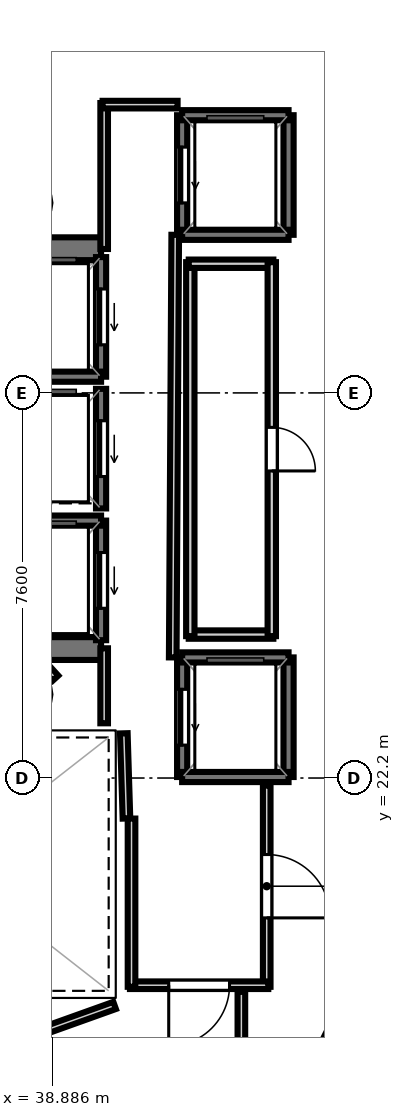
"""IFC4 building model, lengths in metres.
Left out: names, types, materials, properties, quantities, classifications, styles, units other than length and angle.
Written with IfcOpenShell. Run it as: python <this file> out.ifc"""

import sys

from ifc_helpers import new_model, si_unit, direction, frame, frame_2d, origin, place, context, subcontext, project, spatial, rectangle, extrude, element, fill, save


model = new_model("IFC4")
c1 = context("Model", 3, precision=1e-05, world=origin(), true_north=direction((0.0, 1.0)))
c2 = subcontext(c1, "Body", "Model", "MODEL_VIEW")
j1 = project(units=[si_unit("LENGTHUNIT", "METRE"), si_unit("PLANEANGLEUNIT", "RADIAN")], contexts=[c1])
p1 = place(None, origin())
s1 = spatial("IfcSite", under=j1, at=p1, CompositionType="ELEMENT")
p2 = place(p1, origin())
s2 = spatial("IfcBuilding", under=s1, at=p2, CompositionType="ELEMENT")
p3 = place(p2, frame((0.0, 0.0, 313.9)))
s3 = spatial("IfcBuildingStorey", under=s2, at=p3, CompositionType="ELEMENT", Elevation=313.9)
p4 = place(p3, frame((29.33, 32.645, 0.0), z_axis=(0.0, 0.0, 1.0), x_axis=(1.0, 0.0, 0.0)))
e1 = element("IfcWall", 1, at=p4, inside=s3, PredefinedType="SHEAR", context=c2, shape_type="SweptSolid", body=[
    extrude(rectangle(XDim=10.52, YDim=0.45, at=frame_2d((5.26, 0.0))), origin(), (0.0, 0.0, 1.0), 3.52),
])
p5 = place(p4, frame((0.895, 0.0, 0.0)))
e2 = element("IfcOpeningElement", 2, at=p5, cuts=e1, PredefinedType="OPENING", context=c2, shape_type="SweptSolid", body=[
    extrude(rectangle(XDim=1.25, YDim=2.15, at=frame_2d((0.625, 1.075))), frame((0.0, 0.235, 0.0), z_axis=(0.0, -1.0, 0.0), x_axis=(1.0, 0.0, 0.0)), (0.0, 0.0, 1.0), 0.47),
])
p6 = place(p3, frame((29.33, 24.755, 0.0), z_axis=(0.0, 0.0, 1.0), x_axis=(1.0, 0.0, 0.0)))
e3 = element("IfcWall", 3, at=p6, inside=s3, PredefinedType="SHEAR", context=c2, shape_type="SweptSolid", body=[
    extrude(rectangle(XDim=10.52, YDim=0.45, at=frame_2d((5.26, 0.0))), origin(), (0.0, 0.0, 1.0), 3.52),
])
p7 = place(p6, frame((0.695, 0.0, 0.0)))
e4 = element("IfcOpeningElement", 4, at=p7, cuts=e3, PredefinedType="OPENING", context=c2, shape_type="SweptSolid", body=[
    extrude(rectangle(XDim=1.25, YDim=2.15, at=frame_2d((0.625, 1.075))), frame((0.0, 0.235, 0.0), z_axis=(0.0, -1.0, 0.0), x_axis=(1.0, 0.0, 0.0)), (0.0, 0.0, 1.0), 0.47),
])
p8 = place(p3, frame((39.85, 30.12, 0.0), z_axis=(0.0, 0.0, 1.0), x_axis=(0.0, 1.0, 0.0)))
e5 = element("IfcWall", 5, at=p8, inside=s3, PredefinedType="SOLIDWALL", context=c2, shape_type="SweptSolid", body=[
    extrude(rectangle(XDim=2.36, YDim=0.2, at=frame_2d((1.18, 0.0))), origin(), (0.0, 0.0, 1.0), 3.52),
])
p9 = place(p8, frame((0.63, 0.0, 0.0)))
e6 = element("IfcOpeningElement", 6, at=p9, cuts=e5, PredefinedType="OPENING", context=c2, shape_type="SweptSolid", body=[
    extrude(rectangle(XDim=1.1, YDim=2.15, at=frame_2d((0.55, 1.075))), frame((0.0, 0.11, 0.0), z_axis=(0.0, -1.0, 0.0), x_axis=(1.0, 0.0, 0.0)), (0.0, 0.0, 1.0), 0.22),
])
p10 = place(p3, frame((37.75, 30.12, 0.0), z_axis=(0.0, 0.0, 1.0), x_axis=(1.0, 0.0, 0.0)))
e7 = element("IfcWall", 7, at=p10, inside=s3, PredefinedType="SOLIDWALL", context=c2, shape_type="SweptSolid", body=[
    extrude(rectangle(XDim=2.1, YDim=0.2, at=frame_2d((1.05, 0.0))), origin(), (0.0, 0.0, 1.0), 3.52),
])
p11 = place(p3, frame((39.85, 24.92, 0.0), z_axis=(0.0, 0.0, 1.0), x_axis=(0.0, 1.0, 0.0)))
e8 = element("IfcWall", 8, at=p11, inside=s3, PredefinedType="SOLIDWALL", context=c2, shape_type="SweptSolid", body=[
    extrude(rectangle(XDim=2.36, YDim=0.2, at=frame_2d((1.18, 0.0))), origin(), (0.0, 0.0, 1.0), 3.52),
])
p12 = place(p11, frame((0.63, 0.0, 0.0)))
e9 = element("IfcOpeningElement", 9, at=p12, cuts=e8, PredefinedType="OPENING", context=c2, shape_type="SweptSolid", body=[
    extrude(rectangle(XDim=1.1, YDim=2.15, at=frame_2d((0.55, 1.075))), frame((0.0, 0.11, 0.0), z_axis=(0.0, -1.0, 0.0), x_axis=(1.0, 0.0, 0.0)), (0.0, 0.0, 1.0), 0.22),
])
p13 = place(p3, frame((37.75, 27.28, 0.0), z_axis=(0.0, 0.0, 1.0), x_axis=(1.0, 0.0, 0.0)))
e10 = element("IfcWall", 10, at=p13, inside=s3, PredefinedType="SOLIDWALL", context=c2, shape_type="SweptSolid", body=[
    extrude(rectangle(XDim=2.1, YDim=0.2, at=frame_2d((1.05, 0.0))), origin(), (0.0, 0.0, 1.0), 3.52),
])
p14 = place(p3, frame((39.85, 27.52, 0.0), z_axis=(0.0, 0.0, 1.0), x_axis=(0.0, 1.0, 0.0)))
e11 = element("IfcWall", 11, at=p14, inside=s3, PredefinedType="SOLIDWALL", context=c2, shape_type="SweptSolid", body=[
    extrude(rectangle(XDim=2.36, YDim=0.2, at=frame_2d((1.18, 0.0))), origin(), (0.0, 0.0, 1.0), 3.52),
])
p15 = place(p14, frame((0.63, 0.0, 0.0)))
e12 = element("IfcOpeningElement", 12, at=p15, cuts=e11, PredefinedType="OPENING", context=c2, shape_type="SweptSolid", body=[
    extrude(rectangle(XDim=1.1, YDim=2.15, at=frame_2d((0.55, 1.075))), frame((0.0, 0.11, 0.0), z_axis=(0.0, -1.0, 0.0), x_axis=(1.0, 0.0, 0.0)), (0.0, 0.0, 1.0), 0.22),
])
p16 = place(p3, frame((43.55, 22.22, 0.0), z_axis=(0.0, 0.0, 1.0), x_axis=(0.0, 1.0, 0.0)))
e13 = element("IfcWall", 13, at=p16, inside=s3, PredefinedType="SOLIDWALL", context=c2, shape_type="SweptSolid", body=[
    extrude(rectangle(XDim=2.36, YDim=0.2, at=frame_2d((1.18, 0.0))), origin(), (0.0, 0.0, 1.0), 3.52),
])
p17 = place(p3, frame((41.45, 22.22, 0.0), z_axis=(0.0, 0.0, 1.0), x_axis=(0.0, 1.0, 0.0)))
e14 = element("IfcWall", 14, at=p17, inside=s3, PredefinedType="SOLIDWALL", context=c2, shape_type="SweptSolid", body=[
    extrude(rectangle(XDim=2.36, YDim=0.2, at=frame_2d((1.18, 0.0))), origin(), (0.0, 0.0, 1.0), 3.52),
])
p18 = place(p17, frame((0.63, 0.0, 0.0)))
e15 = element("IfcOpeningElement", 15, at=p18, cuts=e14, PredefinedType="OPENING", context=c2, shape_type="SweptSolid", body=[
    extrude(rectangle(XDim=1.1, YDim=2.15, at=frame_2d((0.55, 1.075))), frame((0.0, 0.11, 0.0), z_axis=(0.0, -1.0, 0.0), x_axis=(1.0, 0.0, 0.0)), (0.0, 0.0, 1.0), 0.22),
])
for number, where, z_axis, x_axis in (
    (16, (41.45, 24.58, 0.0), (0.0, 0.0, 1.0), (1.0, 0.0, 0.0)),
    (17, (41.45, 22.22, 0.0), (0.0, 0.0, 1.0), (1.0, 0.0, 0.0)),
):
    element("IfcWall", number, at=place(p3, frame(where, z_axis=z_axis, x_axis=x_axis)), inside=s3, PredefinedType="SOLIDWALL", context=c2, shape_type="SweptSolid", body=[
        extrude(rectangle(XDim=2.1, YDim=0.2, at=frame_2d((1.05, 0.0))), origin(), (0.0, 0.0, 1.0), 3.52),
    ])
p19 = place(p3, frame((43.55, 32.92, 0.0), z_axis=(0.0, 0.0, 1.0), x_axis=(0.0, 1.0, 0.0)))
e18 = element("IfcWall", 18, at=p19, inside=s3, PredefinedType="SOLIDWALL", context=c2, shape_type="SweptSolid", body=[
    extrude(rectangle(XDim=2.36, YDim=0.2, at=frame_2d((1.18, 0.0))), origin(), (0.0, 0.0, 1.0), 3.52),
])
p20 = place(p3, frame((41.45, 32.92, 0.0), z_axis=(0.0, 0.0, 1.0), x_axis=(0.0, 1.0, 0.0)))
e19 = element("IfcWall", 19, at=p20, inside=s3, PredefinedType="SOLIDWALL", context=c2, shape_type="SweptSolid", body=[
    extrude(rectangle(XDim=2.36, YDim=0.2, at=frame_2d((1.18, 0.0))), origin(), (0.0, 0.0, 1.0), 3.52),
])
p21 = place(p20, frame((0.63, 0.0, 0.0)))
e20 = element("IfcOpeningElement", 20, at=p21, cuts=e19, PredefinedType="OPENING", context=c2, shape_type="SweptSolid", body=[
    extrude(rectangle(XDim=1.1, YDim=2.15, at=frame_2d((0.55, 1.075))), frame((0.0, 0.11, 0.0), z_axis=(0.0, -1.0, 0.0), x_axis=(1.0, 0.0, 0.0)), (0.0, 0.0, 1.0), 0.22),
])
for number, where, z_axis, x_axis in (
    (21, (41.45, 35.28, 0.0), (0.0, 0.0, 1.0), (1.0, 0.0, 0.0)),
    (22, (41.45, 32.92, 0.0), (0.0, 0.0, 1.0), (1.0, 0.0, 0.0)),
):
    element("IfcWall", number, at=place(p3, frame(where, z_axis=z_axis, x_axis=x_axis)), inside=s3, PredefinedType="SOLIDWALL", context=c2, shape_type="SweptSolid", body=[
        extrude(rectangle(XDim=2.1, YDim=0.2, at=frame_2d((1.05, 0.0))), origin(), (0.0, 0.0, 1.0), 3.52),
    ])
p22 = place(p3, frame((40.351, 21.401, 0.0), z_axis=(0.0, 0.0, 1.0), x_axis=(-0.031058045979, 0.999517582527, 0.0)))
e23 = element("IfcWall", 23, at=p22, inside=s3, PredefinedType="PARTITIONING", context=c2, shape_type="SweptSolid", body=[
    extrude(rectangle(XDim=1.682, YDim=0.15, at=frame_2d((0.841, 0.0))), origin(), (0.0, 0.0, 1.0), 2.84),
])
p23 = place(p3, frame((39.911, 23.28, 0.0), z_axis=(0.0, 0.0, 1.0), x_axis=(0.0, 1.0, 0.0)))
e24 = element("IfcWall", 24, at=p23, inside=s3, PredefinedType="PARTITIONING", context=c2, shape_type="SweptSolid", body=[
    extrude(rectangle(XDim=1.48, YDim=0.15, at=frame_2d((0.74, 0.0))), origin(), (0.0, 0.0, 1.0), 2.84),
])
p24 = place(p3, frame((39.911, 32.64, 0.0), z_axis=(0.0, 0.0, 1.0), x_axis=(0.0, 1.0, 0.0)))
e25 = element("IfcWall", 25, at=p24, inside=s3, PredefinedType="PARTITIONING", context=c2, shape_type="SweptSolid", body=[
    extrude(rectangle(XDim=2.88, YDim=0.15, at=frame_2d((1.44, 0.0))), origin(), (0.0, 0.0, 1.0), 2.84),
])
p25 = place(p3, frame((39.88, 35.489, 0.0), z_axis=(0.0, 0.0, 1.0), x_axis=(1.0, 0.0, 0.0)))
e26 = element("IfcWall", 26, at=p25, inside=s3, PredefinedType="PARTITIONING", context=c2, shape_type="SweptSolid", body=[
    extrude(rectangle(XDim=1.48, YDim=0.15, at=frame_2d((0.74, 0.0))), origin(), (0.0, 0.0, 1.0), 2.84),
])
p26 = place(p3, frame((41.313, 32.92, 0.0), z_axis=(0.0, 0.0, 1.0), x_axis=(-0.005942518022, -0.999982343084, 0.0)))
e27 = element("IfcWall", 27, at=p26, inside=s3, PredefinedType="PARTITIONING", context=c2, shape_type="SweptSolid", body=[
    extrude(rectangle(XDim=8.34, YDim=0.15, at=frame_2d((4.17, 0.0))), origin(), (0.0, 0.0, 1.0), 2.84),
])
p27 = place(p3, frame((43.119, 22.05, 0.0), z_axis=(0.0, 0.0, 1.0), x_axis=(0.0, -1.0, 0.0)))
e28 = element("IfcWall", 28, at=p27, inside=s3, PredefinedType="PARTITIONING", context=c2, shape_type="SweptSolid", body=[
    extrude(rectangle(XDim=3.97, YDim=0.15, at=frame_2d((1.985, 0.0))), origin(), (0.0, 0.0, 1.0), 2.84),
])
p28 = place(p27, frame((1.36, 0.0, 0.0)))
e29 = element("IfcOpeningElement", 29, at=p28, cuts=e28, PredefinedType="OPENING", context=c2, shape_type="SweptSolid", body=[
    extrude(rectangle(XDim=1.25, YDim=2.2, at=frame_2d((0.625, 1.1))), frame((0.0, 0.085, 0.0), z_axis=(0.0, -1.0, 0.0), x_axis=(1.0, 0.0, 0.0)), (0.0, 0.0, 1.0), 0.17),
])
p29 = place(p3, frame((43.15, 18.111, 0.0), z_axis=(0.0, 0.0, 1.0), x_axis=(-1.0, 0.0, 0.0)))
e30 = element("IfcWall", 30, at=p29, inside=s3, PredefinedType="PARTITIONING", context=c2, shape_type="SweptSolid", body=[
    extrude(rectangle(XDim=2.73, YDim=0.15, at=frame_2d((1.365, 0.0))), origin(), (0.0, 0.0, 1.0), 2.84),
])
p30 = place(p29, frame((0.765, 0.0, 0.0)))
e31 = element("IfcOpeningElement", 31, at=p30, cuts=e30, PredefinedType="OPENING", context=c2, shape_type="SweptSolid", body=[
    extrude(rectangle(XDim=1.2, YDim=2.15, at=frame_2d((0.6, 1.075))), frame((0.0, 0.085, 0.0), z_axis=(0.0, -1.0, 0.0), x_axis=(1.0, 0.0, 0.0)), (0.0, 0.0, 1.0), 0.17),
])
p31 = place(p3, frame((40.451, 18.08, 0.0), z_axis=(0.0, 0.0, 1.0), x_axis=(0.0, 1.0, 0.0)))
e32 = element("IfcWall", 32, at=p31, inside=s3, PredefinedType="PARTITIONING", context=c2, shape_type="SweptSolid", body=[
    extrude(rectangle(XDim=3.32, YDim=0.15, at=frame_2d((1.66, 0.0))), origin(), (0.0, 0.0, 1.0), 2.84),
])
p32 = place(p3, frame((43.25, 25.031, 0.0), z_axis=(0.0, 0.0, 1.0), x_axis=(-1.0, 0.0, 0.0)))
e33 = element("IfcWall", 33, at=p32, inside=s3, PredefinedType="PLUMBINGWALL", context=c2, shape_type="SweptSolid", body=[
    extrude(rectangle(XDim=1.67, YDim=0.165, at=frame_2d((0.835, 0.0))), origin(), (0.0, 0.0, 1.0), 2.84),
])
p33 = place(p3, frame((41.611, 25.0, 0.0), z_axis=(0.0, 0.0, 1.0), x_axis=(0.0, 1.0, 0.0)))
e34 = element("IfcWall", 34, at=p33, inside=s3, PredefinedType="PLUMBINGWALL", context=c2, shape_type="SweptSolid", body=[
    extrude(rectangle(XDim=7.38, YDim=0.165, at=frame_2d((3.69, 0.0))), origin(), (0.0, 0.0, 1.0), 2.84),
])
p34 = place(p3, frame((41.58, 32.349, 0.0), z_axis=(0.0, 0.0, 1.0), x_axis=(1.0, 0.0, 0.0)))
e35 = element("IfcWall", 35, at=p34, inside=s3, PredefinedType="PLUMBINGWALL", context=c2, shape_type="SweptSolid", body=[
    extrude(rectangle(XDim=1.67, YDim=0.165, at=frame_2d((0.835, 0.0))), origin(), (0.0, 0.0, 1.0), 2.84),
])
p35 = place(p3, frame((43.219, 32.38, 0.0), z_axis=(0.0, 0.0, 1.0), x_axis=(0.0, -1.0, 0.0)))
e36 = element("IfcWall", 36, at=p35, inside=s3, PredefinedType="PLUMBINGWALL", context=c2, shape_type="SweptSolid", body=[
    extrude(rectangle(XDim=7.38, YDim=0.165, at=frame_2d((3.69, 0.0))), origin(), (0.0, 0.0, 1.0), 2.84),
])
p36 = place(p35, frame((3.26, 0.0, 0.0)))
e37 = element("IfcOpeningElement", 37, at=p36, cuts=e36, PredefinedType="OPENING", context=c2, shape_type="SweptSolid", body=[
    extrude(rectangle(XDim=0.86, YDim=2.05, at=frame_2d((0.43, 1.025))), frame((0.0, 0.093, 0.0), z_axis=(0.0, -1.0, 0.0), x_axis=(1.0, 0.0, 0.0)), (0.0, 0.0, 1.0), 0.185),
])
p37 = place(p3, frame((38.951, 24.171, 0.0), z_axis=(0.0, 0.0, 1.0), x_axis=(-0.674186852077, 0.738560822469, 0.0)))
e38 = element("IfcWall", 38, at=p37, inside=s3, PredefinedType="PARTITIONING", context=c2, shape_type="SweptSolid", body=[
    extrude(rectangle(XDim=0.281, YDim=0.15, at=frame_2d((0.14, 0.0))), origin(), (0.0, 0.0, 1.0), 2.84),
])
p38 = place(p3, frame((36.81, 16.529, 0.0), z_axis=(0.0, 0.0, 1.0), x_axis=(0.941548344365, 0.33687789364, 0.0)))
e39 = element("IfcWall", 39, at=p38, inside=s3, PredefinedType="PARTITIONING", context=c2, shape_type="SweptSolid", body=[
    extrude(rectangle(XDim=3.513, YDim=0.15, at=frame_2d((1.756, 0.0))), origin(), (0.0, 0.0, 1.0), 2.84),
])
p39 = place(p3, frame((42.619, 17.98, 0.0), z_axis=(0.0, 0.0, 1.0), x_axis=(0.0, -1.0, 0.0)))
e40 = element("IfcWall", 40, at=p39, inside=s3, PredefinedType="PARTITIONING", context=c2, shape_type="SweptSolid", body=[
    extrude(rectangle(XDim=1.93, YDim=0.15, at=frame_2d((0.965, 0.0))), origin(), (0.0, 0.0, 1.0), 2.84),
])
p40 = place(p3, frame((54.906, 38.4, 0.0), z_axis=(0.0, 0.0, 1.0), x_axis=(-0.445365926059, -0.895348642656, 0.0)))
e41 = element("IfcWall", 41, at=p40, inside=s3, PredefinedType="PARTITIONING", context=c2, shape_type="SweptSolid", body=[
    extrude(rectangle(XDim=34.796, YDim=0.105, at=frame_2d((17.398, 0.0))), origin(), (0.0, 0.0, 1.0), 2.84),
])
p41 = place(p9, origin())
e42 = element("IfcDoor", 42, at=p41, inside=s3, OperationType="SLIDING_TO_LEFT", PredefinedType="DOOR", context=c2, shape_type="SweptSolid", body=[
    extrude(rectangle(XDim=1.1, YDim=2.15, at=frame_2d((0.55, 1.075))), frame((0.0, 0.025, 0.0), z_axis=(0.0, -1.0, 0.0), x_axis=(1.0, 0.0, 0.0)), (0.0, 0.0, 1.0), 0.05),
])
fill(e6, e42)
p42 = place(p12, origin())
e43 = element("IfcDoor", 43, at=p42, inside=s3, OperationType="SLIDING_TO_LEFT", PredefinedType="DOOR", context=c2, shape_type="SweptSolid", body=[
    extrude(rectangle(XDim=1.1, YDim=2.15, at=frame_2d((0.55, 1.075))), frame((0.0, 0.025, 0.0), z_axis=(0.0, -1.0, 0.0), x_axis=(1.0, 0.0, 0.0)), (0.0, 0.0, 1.0), 0.05),
])
fill(e9, e43)
p43 = place(p15, origin())
e44 = element("IfcDoor", 44, at=p43, inside=s3, OperationType="SLIDING_TO_LEFT", PredefinedType="DOOR", context=c2, shape_type="SweptSolid", body=[
    extrude(rectangle(XDim=1.1, YDim=2.15, at=frame_2d((0.55, 1.075))), frame((0.0, 0.025, 0.0), z_axis=(0.0, -1.0, 0.0), x_axis=(1.0, 0.0, 0.0)), (0.0, 0.0, 1.0), 0.05),
])
fill(e12, e44)
p44 = place(p18, origin())
e45 = element("IfcDoor", 45, at=p44, inside=s3, OperationType="SLIDING_TO_LEFT", PredefinedType="DOOR", context=c2, shape_type="SweptSolid", body=[
    extrude(rectangle(XDim=1.1, YDim=2.15, at=frame_2d((0.55, 1.075))), frame((0.0, 0.025, 0.0), z_axis=(0.0, -1.0, 0.0), x_axis=(1.0, 0.0, 0.0)), (0.0, 0.0, 1.0), 0.05),
])
fill(e15, e45)
p45 = place(p21, origin())
e46 = element("IfcDoor", 46, at=p45, inside=s3, OperationType="SLIDING_TO_LEFT", PredefinedType="DOOR", context=c2, shape_type="SweptSolid", body=[
    extrude(rectangle(XDim=1.1, YDim=2.15, at=frame_2d((0.55, 1.075))), frame((0.0, 0.025, 0.0), z_axis=(0.0, -1.0, 0.0), x_axis=(1.0, 0.0, 0.0)), (0.0, 0.0, 1.0), 0.05),
])
fill(e20, e46)
p46 = place(p30, origin())
e47 = element("IfcDoor", 47, at=p46, inside=s3, OperationType="SINGLE_SWING_RIGHT", PredefinedType="DOOR", context=c2, shape_type="SweptSolid", body=[
    extrude(rectangle(XDim=1.2, YDim=2.15, at=frame_2d((0.6, 1.075))), frame((0.0, 0.025, 0.0), z_axis=(0.0, -1.0, 0.0), x_axis=(1.0, 0.0, 0.0)), (0.0, 0.0, 1.0), 0.05),
])
fill(e31, e47)
p47 = place(p28, origin())
e48 = element("IfcDoor", 48, at=p47, inside=s3, OperationType="SINGLE_SWING_RIGHT", PredefinedType="DOOR", context=c2, shape_type="SweptSolid", body=[
    extrude(rectangle(XDim=1.25, YDim=2.2, at=frame_2d((0.625, 1.1))), frame((0.0, 0.025, 0.0), z_axis=(0.0, -1.0, 0.0), x_axis=(1.0, 0.0, 0.0)), (0.0, 0.0, 1.0), 0.05),
])
fill(e29, e48)
p48 = place(p36, origin())
e49 = element("IfcDoor", 49, at=p48, inside=s3, OperationType="SINGLE_SWING_RIGHT", PredefinedType="DOOR", context=c2, shape_type="SweptSolid", body=[
    extrude(rectangle(XDim=0.86, YDim=2.05, at=frame_2d((0.43, 1.025))), frame((0.0, 0.025, 0.0), z_axis=(0.0, -1.0, 0.0), x_axis=(1.0, 0.0, 0.0)), (0.0, 0.0, 1.0), 0.05),
])
fill(e37, e49)
save(model, sys.argv[1])
